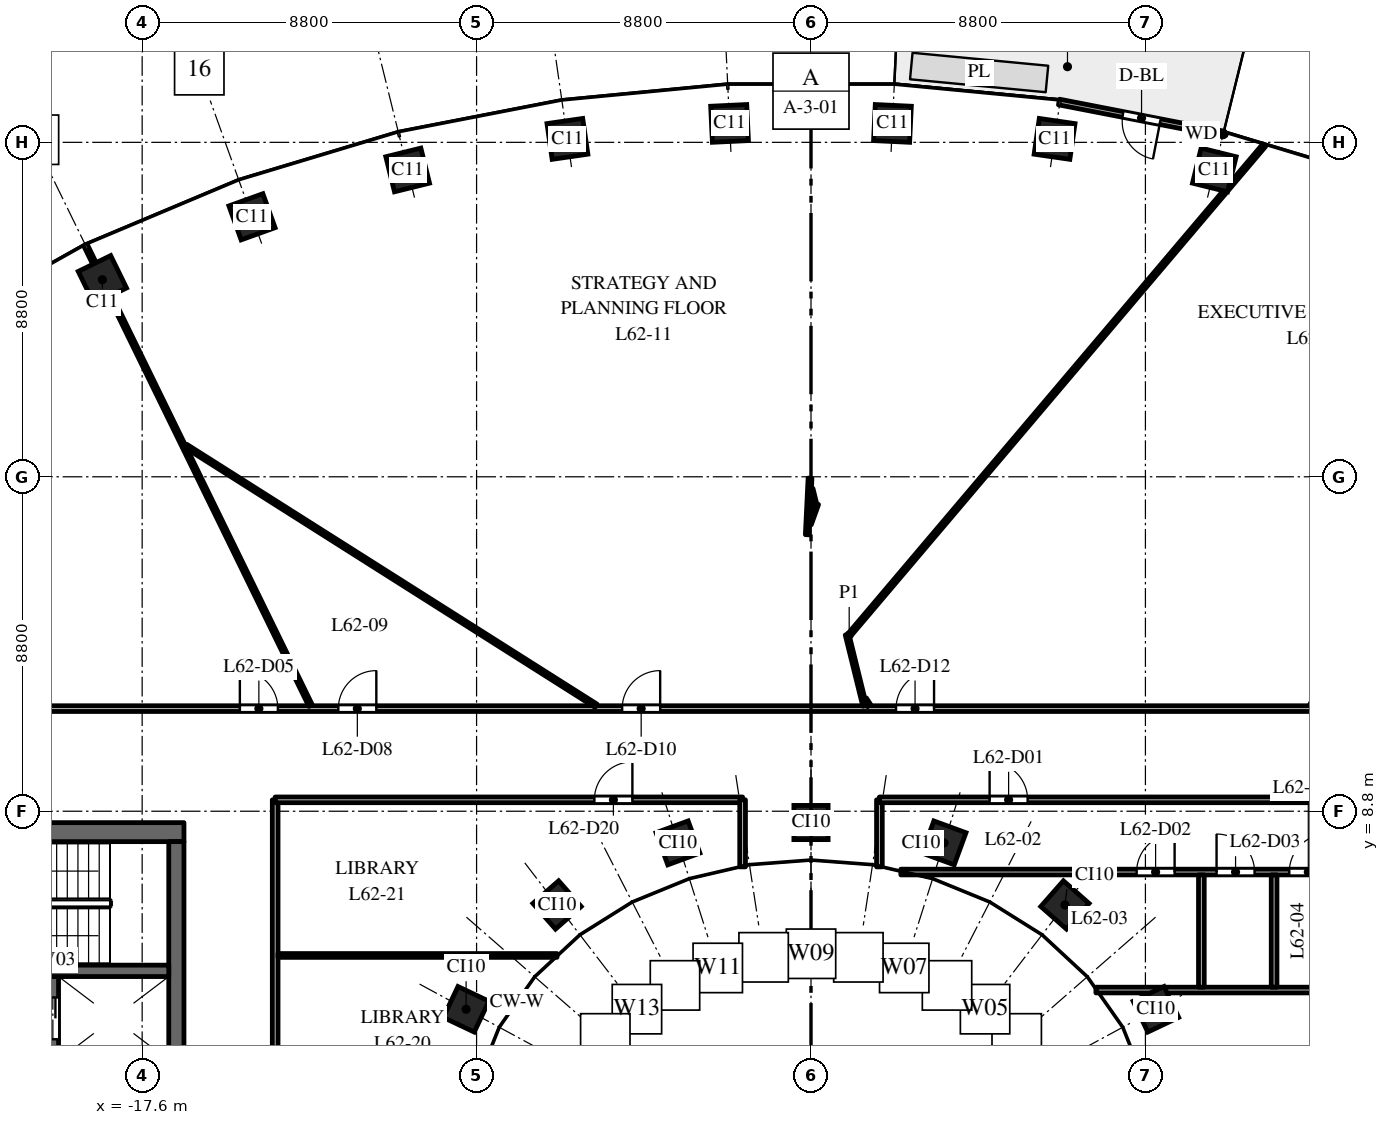
"""IFC4 building model, lengths in metres.
Left out: names, types, materials, properties, quantities, classifications, styles, units other than length and angle.
Written with IfcOpenShell. Run it as: python <this file> out.ifc"""

import sys

from ifc_helpers import new_model, si_unit, direction, frame, frame_2d, origin, origin_2d, place, context, subcontext, project, spatial, rectangle, extrude, element, fill, save


model = new_model("IFC4")
c1 = context("Model", 3, precision=1e-05, world=origin(), true_north=direction((0.0, 1.0)))
c2 = subcontext(c1, "Body", "Model", "MODEL_VIEW")
j1 = project(units=[si_unit("LENGTHUNIT", "METRE"), si_unit("PLANEANGLEUNIT", "RADIAN")], contexts=[c1])
p1 = place(None, origin())
s1 = spatial("IfcSite", under=j1, at=p1, CompositionType="ELEMENT")
p2 = place(p1, origin())
s2 = spatial("IfcBuilding", under=s1, at=p2, CompositionType="ELEMENT")
p3 = place(p2, frame((0.0, 0.0, 291.0)))
s3 = spatial("IfcBuildingStorey", under=s2, at=p3, CompositionType="ELEMENT", Elevation=291.0)
for number, where, z_axis, x_axis in (
    (1, (10.613, 25.674, 0.0), (0.0, 0.0, 1.0), (-0.971, 0.24, 0.0)),
    (2, (6.409, 26.491, 0.0), (0.0, 0.0, 1.0), (-0.99, 0.143, 0.0)),
    (3, (2.143, 26.898, 0.0), (0.0, 0.0, 1.0), (-0.999, 0.048, 0.0)),
    (4, (-2.143, 26.898, 0.0), (0.0, 0.0, 1.0), (-0.999, -0.048, 0.0)),
    (5, (-6.409, 26.491, 0.0), (0.0, 0.0, 1.0), (-0.99, -0.143, 0.0)),
    (6, (-10.613, 25.674, 0.0), (0.0, 0.0, 1.0), (-0.971, -0.24, 0.0)),
    (7, (-14.709, 24.441, 0.0), (0.0, 0.0, 1.0), (-0.941, -0.338, 0.0)),
    (8, (-18.646, 22.785, 0.0), (0.0, 0.0, 1.0), (-0.898, -0.439, 0.0)),
):
    element("IfcColumn", number, at=place(p3, frame(where, z_axis=z_axis, x_axis=x_axis)), inside=s3, PredefinedType="COLUMN", context=c2, shape_type="SweptSolid", body=[
        extrude(rectangle(XDim=0.95, YDim=0.95, at=origin_2d()), origin(), (0.0, 0.0, 1.0), 4.0),
    ])
for number, where, z_axis, x_axis in (
    (9, (9.076, 3.588, 0.0), (0.0, 0.0, 1.0), (-0.429, 0.903, 0.0)),
    (10, (6.682, 6.334, 0.0), (0.0, 0.0, 1.0), (-0.751, 0.66, 0.0)),
    (11, (3.501, 7.967, 0.0), (0.0, 0.0, 1.0), (-0.939, 0.344, 0.0)),
    (12, (0.0, 8.503, 0.0), (0.0, 0.0, 1.0), (-1.0, 0.0, 0.0)),
    (13, (-3.501, 7.967, 0.0), (0.0, 0.0, 1.0), (-0.939, -0.344, 0.0)),
    (14, (-6.682, 6.334, 0.0), (0.0, 0.0, 1.0), (-0.751, -0.66, 0.0)),
    (15, (-9.076, 3.588, 0.0), (0.0, 0.0, 1.0), (-0.429, -0.903, 0.0)),
):
    element("IfcColumn", number, at=place(p3, frame(where, z_axis=z_axis, x_axis=x_axis)), inside=s3, PredefinedType="COLUMN", context=c2, shape_type="SweptSolid", body=[
        extrude(rectangle(XDim=0.9, YDim=0.9, at=origin_2d()), origin(), (0.0, 0.0, 1.0), 4.0),
    ])
p4 = place(p3, frame((-16.5, 8.25, 0.0), z_axis=(0.0, 0.0, 1.0), x_axis=(-1.0, 0.0, 0.0)))
e16 = element("IfcWall", 16, at=p4, inside=s3, PredefinedType="SHEAR", context=c2, shape_type="SweptSolid", body=[
    extrude(rectangle(XDim=15.0, YDim=0.5, at=frame_2d((7.5, 0.0))), origin(), (0.0, 0.0, 1.0), 3.7),
])
p5 = place(p4, frame((6.9, 0.0, 0.0)))
e17 = element("IfcOpeningElement", 17, at=p5, cuts=e16, PredefinedType="OPENING", context=c2, shape_type="SweptSolid", body=[
    extrude(rectangle(XDim=1.2, YDim=2.1, at=frame_2d((0.6, 1.05))), frame((0.0, 0.26, 0.0), z_axis=(0.0, -1.0, 0.0), x_axis=(1.0, 0.0, 0.0)), (0.0, 0.0, 1.0), 0.52),
])
p6 = place(p4, frame((12.425, 0.0, 0.0)))
e18 = element("IfcOpeningElement", 18, at=p6, cuts=e16, PredefinedType="OPENING", context=c2, shape_type="SweptSolid", body=[
    extrude(rectangle(XDim=0.9, YDim=2.1, at=frame_2d((0.45, 1.05))), frame((0.0, 0.26, 0.0), z_axis=(0.0, -1.0, 0.0), x_axis=(1.0, 0.0, 0.0)), (0.0, 0.0, 1.0), 0.52),
])
p7 = place(p3, frame((-19.95, -4.45, 0.0), z_axis=(0.0, 0.0, 1.0), x_axis=(0.0, 1.0, 0.0)))
e19 = element("IfcWall", 19, at=p7, inside=s3, PredefinedType="SHEAR", context=c2, shape_type="SweptSolid", body=[
    extrude(rectangle(XDim=8.9, YDim=0.3, at=frame_2d((4.45, 0.0))), origin(), (0.0, 0.0, 1.0), 3.7),
])
p8 = place(p7, frame((0.775, 0.0, 0.0)))
e20 = element("IfcOpeningElement", 20, at=p8, cuts=e19, PredefinedType="OPENING", context=c2, shape_type="SweptSolid", body=[
    extrude(rectangle(XDim=1.2, YDim=2.1, at=frame_2d((0.6, 1.05))), frame((0.0, 0.16, 0.0), z_axis=(0.0, -1.0, 0.0), x_axis=(1.0, 0.0, 0.0)), (0.0, 0.0, 1.0), 0.32),
])
p9 = place(p7, frame((7.25, 0.0, 0.0)))
e21 = element("IfcOpeningElement", 21, at=p9, cuts=e19, PredefinedType="OPENING", context=c2, shape_type="SweptSolid", body=[
    extrude(rectangle(XDim=1.1, YDim=2.1, at=frame_2d((0.55, 1.05))), frame((0.0, 0.16, 0.0), z_axis=(0.0, -1.0, 0.0), x_axis=(1.0, 0.0, 0.0)), (0.0, 0.0, 1.0), 0.32),
])
p10 = place(p3, frame((-16.7, -8.0, 0.0), z_axis=(0.0, 0.0, 1.0), x_axis=(0.0, 1.0, 0.0)))
e22 = element("IfcWall", 22, at=p10, inside=s3, PredefinedType="SHEAR", context=c2, shape_type="SweptSolid", body=[
    extrude(rectangle(XDim=16.0, YDim=0.4, at=frame_2d((8.0, 0.0))), origin(), (0.0, 0.0, 1.0), 3.7),
])
p11 = place(p3, frame((-16.9, 4.6, 0.0), z_axis=(0.0, 0.0, 1.0), x_axis=(-1.0, 0.0, 0.0)))
e23 = element("IfcWall", 23, at=p11, inside=s3, PredefinedType="SHEAR", context=c2, shape_type="SweptSolid", body=[
    extrude(rectangle(XDim=6.18, YDim=0.3, at=frame_2d((3.09, 0.0))), origin(), (0.0, 0.0, 1.0), 3.7),
])
p12 = place(p11, frame((4.9, 0.0, 0.0)))
e24 = element("IfcOpeningElement", 24, at=p12, cuts=e23, PredefinedType="OPENING", context=c2, shape_type="SweptSolid", body=[
    extrude(rectangle(XDim=1.1, YDim=2.1, at=frame_2d((0.55, 1.05))), frame((0.0, 0.16, 0.0), z_axis=(0.0, -1.0, 0.0), x_axis=(1.0, 0.0, 0.0)), (0.0, 0.0, 1.0), 0.32),
])
p13 = place(p3, frame((10.871, 26.617, 0.0), z_axis=(0.0, 0.0, 1.0), x_axis=(-0.981631174778, 0.190788460615, 0.0)))
e25 = element("IfcWall", 25, at=p13, inside=s3, PredefinedType="STANDARD", context=c2, shape_type="SweptSolid", body=[
    extrude(rectangle(XDim=4.426, YDim=0.15, at=frame_2d((2.213, 0.0))), origin(), (0.0, 0.0, 1.0), 3.7),
])
p14 = place(p13, frame((1.713, 0.0, 0.0)))
e26 = element("IfcOpeningElement", 26, at=p14, cuts=e25, PredefinedType="OPENING", context=c2, shape_type="SweptSolid", body=[
    extrude(rectangle(XDim=1.0, YDim=2.4, at=frame_2d((0.5, 1.2))), frame((0.0, 0.085, 0.0), z_axis=(0.0, -1.0, 0.0), x_axis=(1.0, 0.0, 0.0)), (0.0, 0.0, 1.0), 0.17),
])
p15 = place(p3, frame((-31.5, 11.5, 0.0), z_axis=(0.0, 0.0, 1.0), x_axis=(1.0, 0.0, 0.0)))
e27 = element("IfcWall", 27, at=p15, inside=s3, PredefinedType="PARTITIONING", context=c2, shape_type="SweptSolid", body=[
    extrude(rectangle(XDim=63.0, YDim=0.15, at=frame_2d((31.5, 0.0))), origin(), (0.0, 0.0, 1.0), 2.75),
])
p16 = place(p15, frame((16.471, 0.0, 0.0)))
e28 = element("IfcOpeningElement", 28, at=p16, cuts=e27, PredefinedType="OPENING", context=c2, shape_type="SweptSolid", body=[
    extrude(rectangle(XDim=1.0, YDim=2.1, at=frame_2d((0.5, 1.05))), frame((0.0, 0.085, 0.0), z_axis=(0.0, -1.0, 0.0), x_axis=(1.0, 0.0, 0.0)), (0.0, 0.0, 1.0), 0.17),
])
p17 = place(p15, frame((19.062, 0.0, 0.0)))
e29 = element("IfcOpeningElement", 29, at=p17, cuts=e27, PredefinedType="OPENING", context=c2, shape_type="SweptSolid", body=[
    extrude(rectangle(XDim=1.0, YDim=2.1, at=frame_2d((0.5, 1.05))), frame((0.0, 0.085, 0.0), z_axis=(0.0, -1.0, 0.0), x_axis=(1.0, 0.0, 0.0)), (0.0, 0.0, 1.0), 0.17),
])
p18 = place(p15, frame((26.531, 0.0, 0.0)))
e30 = element("IfcOpeningElement", 30, at=p18, cuts=e27, PredefinedType="OPENING", context=c2, shape_type="SweptSolid", body=[
    extrude(rectangle(XDim=1.0, YDim=2.1, at=frame_2d((0.5, 1.05))), frame((0.0, 0.085, 0.0), z_axis=(0.0, -1.0, 0.0), x_axis=(1.0, 0.0, 0.0)), (0.0, 0.0, 1.0), 0.17),
])
p19 = place(p15, frame((33.738, 0.0, 0.0)))
e31 = element("IfcOpeningElement", 31, at=p19, cuts=e27, PredefinedType="OPENING", context=c2, shape_type="SweptSolid", body=[
    extrude(rectangle(XDim=1.0, YDim=2.1, at=frame_2d((0.5, 1.05))), frame((0.0, 0.085, 0.0), z_axis=(0.0, -1.0, 0.0), x_axis=(1.0, 0.0, 0.0)), (0.0, 0.0, 1.0), 0.17),
])
p20 = place(p15, frame((45.456, 0.0, 0.0)))
e32 = element("IfcOpeningElement", 32, at=p20, cuts=e27, PredefinedType="OPENING", context=c2, shape_type="SweptSolid", body=[
    extrude(rectangle(XDim=1.0, YDim=2.1, at=frame_2d((0.5, 1.05))), frame((0.0, 0.085, 0.0), z_axis=(0.0, -1.0, 0.0), x_axis=(1.0, 0.0, 0.0)), (0.0, 0.0, 1.0), 0.17),
])
p21 = place(p15, frame((57.85, 0.0, 0.0)))
e33 = element("IfcOpeningElement", 33, at=p21, cuts=e27, PredefinedType="OPENING", context=c2, shape_type="SweptSolid", body=[
    extrude(rectangle(XDim=1.0, YDim=2.1, at=frame_2d((0.5, 1.05))), frame((0.0, 0.085, 0.0), z_axis=(0.0, -1.0, 0.0), x_axis=(1.0, 0.0, 0.0)), (0.0, 0.0, 1.0), 0.17),
])
p22 = place(p3, frame((-19.086, 23.685, 0.0), z_axis=(0.0, 0.0, 1.0), x_axis=(0.439180235984, -0.898398976135, 0.0)))
e34 = element("IfcWall", 34, at=p22, inside=s3, PredefinedType="PARTITIONING", context=c2, shape_type="SweptSolid", body=[
    extrude(rectangle(XDim=13.475, YDim=0.1, at=frame_2d((6.738, 0.0))), origin(), (0.0, 0.0, 1.0), 2.75),
])
p23 = place(p3, frame((-16.452, 18.412, 0.0), z_axis=(0.0, 0.0, 1.0), x_axis=(0.844827711376, -0.535038445434, 0.0)))
e35 = element("IfcWall", 35, at=p23, inside=s3, PredefinedType="PARTITIONING", context=c2, shape_type="SweptSolid", body=[
    extrude(rectangle(XDim=12.779, YDim=0.1, at=frame_2d((6.389, 0.0))), origin(), (0.0, 0.0, 1.0), 2.75),
])
p24 = place(p3, frame((-14.1, 0.455, 0.0), z_axis=(0.0, 0.0, 1.0), x_axis=(0.0, 1.0, 0.0)))
e36 = element("IfcWall", 36, at=p24, inside=s3, PredefinedType="PARTITIONING", context=c2, shape_type="SweptSolid", body=[
    extrude(rectangle(XDim=8.645, YDim=0.15, at=frame_2d((4.323, 0.0))), origin(), (0.0, 0.0, 1.0), 3.7),
])
p25 = place(p3, frame((-14.025, 5.005, 0.0), z_axis=(0.0, 0.0, 1.0), x_axis=(1.0, 0.0, 0.0)))
e37 = element("IfcWall", 37, at=p25, inside=s3, PredefinedType="PARTITIONING", context=c2, shape_type="SweptSolid", body=[
    extrude(rectangle(XDim=7.341, YDim=0.1, at=frame_2d((3.67, 0.0))), origin(), (0.0, 0.0, 1.0), 3.0),
])
p26 = place(p3, frame((-14.1, 9.1, 0.0), z_axis=(0.0, 0.0, 1.0), x_axis=(1.0, 0.0, 0.0)))
e38 = element("IfcWall", 38, at=p26, inside=s3, PredefinedType="PARTITIONING", context=c2, shape_type="SweptSolid", body=[
    extrude(rectangle(XDim=12.3, YDim=0.15, at=frame_2d((6.15, 0.0))), origin(), (0.0, 0.0, 1.0), 2.75),
])
p27 = place(p26, frame((8.4, 0.0, 0.0)))
e39 = element("IfcOpeningElement", 39, at=p27, cuts=e38, PredefinedType="OPENING", context=c2, shape_type="SweptSolid", body=[
    extrude(rectangle(XDim=1.0, YDim=2.1, at=frame_2d((0.5, 1.05))), frame((0.0, 0.085, 0.0), z_axis=(0.0, -1.0, 0.0), x_axis=(1.0, 0.0, 0.0)), (0.0, 0.0, 1.0), 0.17),
])
p28 = place(p3, frame((-1.8, 7.336, 0.0), z_axis=(0.0, 0.0, 1.0), x_axis=(0.0, 1.0, 0.0)))
e40 = element("IfcWall", 40, at=p28, inside=s3, PredefinedType="PARTITIONING", context=c2, shape_type="SweptSolid", body=[
    extrude(rectangle(XDim=1.764, YDim=0.15, at=frame_2d((0.882, 0.0))), origin(), (0.0, 0.0, 1.0), 3.0),
])
p29 = place(p3, frame((-0.098, 16.075, 0.0), z_axis=(0.0, 0.0, 1.0), x_axis=(0.048312104461, 0.998832288506, 0.0)))
e41 = element("IfcWall", 41, at=p29, inside=s3, PredefinedType="PARTITIONING", context=c2, shape_type="SweptSolid", body=[
    extrude(rectangle(XDim=1.491, YDim=0.1, at=frame_2d((0.745, 0.0))), origin(), (0.0, 0.0, 1.0), 3.7),
])
p30 = place(p3, frame((-0.041, 16.352, 0.0), z_axis=(0.0, 0.0, 1.0), x_axis=(0.339570618506, 0.940580562763, 0.0)))
e42 = element("IfcWall", 42, at=p30, inside=s3, PredefinedType="PARTITIONING", context=c2, shape_type="SweptSolid", body=[
    extrude(rectangle(XDim=0.569, YDim=0.1, at=frame_2d((0.284, 0.0))), origin(), (0.0, 0.0, 1.0), 3.7),
])
p31 = place(p3, frame((0.003, 17.282, 0.0), z_axis=(0.0, 0.0, 1.0), x_axis=(0.238966259399, -0.971027871314, 0.0)))
e43 = element("IfcWall", 43, at=p31, inside=s3, PredefinedType="PARTITIONING", context=c2, shape_type="SweptSolid", body=[
    extrude(rectangle(XDim=0.403, YDim=0.1, at=frame_2d((0.201, 0.0))), origin(), (0.0, 0.0, 1.0), 3.7),
])
p32 = place(p3, frame((0.95, 13.448, 0.0), z_axis=(0.0, 0.0, 1.0), x_axis=(0.239556864004, -0.970882335254, 0.0)))
e44 = element("IfcWall", 44, at=p32, inside=s3, PredefinedType="PARTITIONING", context=c2, shape_type="SweptSolid", body=[
    extrude(rectangle(XDim=1.929, YDim=0.1, at=frame_2d((0.965, 0.0))), origin(), (0.0, 0.0, 1.0), 3.7),
])
p33 = place(p3, frame((1.005, 13.435, 0.0), z_axis=(0.0, 0.0, 1.0), x_axis=(0.646459104718, 0.762948639115, 0.0)))
e45 = element("IfcWall", 45, at=p33, inside=s3, PredefinedType="PARTITIONING", context=c2, shape_type="SweptSolid", body=[
    extrude(rectangle(XDim=16.892, YDim=0.1, at=frame_2d((8.446, 0.0))), origin(), (0.0, 0.0, 1.0), 2.85),
])
p34 = place(p3, frame((1.416, 11.753, 0.0), z_axis=(0.0, 0.0, 1.0), x_axis=(0.542473755858, -0.840072749353, 0.0)))
e46 = element("IfcWall", 46, at=p34, inside=s3, PredefinedType="PARTITIONING", context=c2, shape_type="SweptSolid", body=[
    extrude(rectangle(XDim=0.208, YDim=0.1, at=frame_2d((0.104, 0.0))), origin(), (0.0, 0.0, 1.0), 3.7),
])
p35 = place(p3, frame((1.8, 7.336, 0.0), z_axis=(0.0, 0.0, 1.0), x_axis=(0.0, 1.0, 0.0)))
e47 = element("IfcWall", 47, at=p35, inside=s3, PredefinedType="PARTITIONING", context=c2, shape_type="SweptSolid", body=[
    extrude(rectangle(XDim=1.764, YDim=0.15, at=frame_2d((0.882, 0.0))), origin(), (0.0, 0.0, 1.0), 3.0),
])
p36 = place(p3, frame((1.8, 9.1, 0.0), z_axis=(0.0, 0.0, 1.0), x_axis=(1.0, 0.0, 0.0)))
e48 = element("IfcWall", 48, at=p36, inside=s3, PredefinedType="PARTITIONING", context=c2, shape_type="SweptSolid", body=[
    extrude(rectangle(XDim=12.3, YDim=0.15, at=frame_2d((6.15, 0.0))), origin(), (0.0, 0.0, 1.0), 2.85),
])
p37 = place(p36, frame((2.9, 0.0, 0.0)))
e49 = element("IfcOpeningElement", 49, at=p37, cuts=e48, PredefinedType="OPENING", context=c2, shape_type="SweptSolid", body=[
    extrude(rectangle(XDim=1.0, YDim=2.1, at=frame_2d((0.5, 1.05))), frame((0.0, 0.085, 0.0), z_axis=(0.0, -1.0, 0.0), x_axis=(1.0, 0.0, 0.0)), (0.0, 0.0, 1.0), 0.17),
])
p38 = place(p3, frame((2.364, 7.2, 0.0), z_axis=(0.0, 0.0, 1.0), x_axis=(1.0, 0.0, 0.0)))
e50 = element("IfcWall", 50, at=p38, inside=s3, PredefinedType="PARTITIONING", context=c2, shape_type="SweptSolid", body=[
    extrude(rectangle(XDim=11.661, YDim=0.15, at=frame_2d((5.831, 0.0))), origin(), (0.0, 0.0, 1.0), 2.75),
])
p39 = place(p38, frame((6.204, 0.0, 0.0)))
e51 = element("IfcOpeningElement", 51, at=p39, cuts=e50, PredefinedType="OPENING", context=c2, shape_type="SweptSolid", body=[
    extrude(rectangle(XDim=1.0, YDim=2.1, at=frame_2d((0.5, 1.05))), frame((0.0, 0.085, 0.0), z_axis=(0.0, -1.0, 0.0), x_axis=(1.0, 0.0, 0.0)), (0.0, 0.0, 1.0), 0.17),
])
p40 = place(p38, frame((8.308, 0.0, 0.0)))
e52 = element("IfcOpeningElement", 52, at=p40, cuts=e50, PredefinedType="OPENING", context=c2, shape_type="SweptSolid", body=[
    extrude(rectangle(XDim=1.0, YDim=2.1, at=frame_2d((0.5, 1.05))), frame((0.0, 0.085, 0.0), z_axis=(0.0, -1.0, 0.0), x_axis=(1.0, 0.0, 0.0)), (0.0, 0.0, 1.0), 0.17),
])
p41 = place(p38, frame((10.222, 0.0, 0.0)))
e53 = element("IfcOpeningElement", 53, at=p41, cuts=e50, PredefinedType="OPENING", context=c2, shape_type="SweptSolid", body=[
    extrude(rectangle(XDim=1.0, YDim=2.1, at=frame_2d((0.5, 1.05))), frame((0.0, 0.085, 0.0), z_axis=(0.0, -1.0, 0.0), x_axis=(1.0, 0.0, 0.0)), (0.0, 0.0, 1.0), 0.17),
])
p42 = place(p3, frame((7.497, 4.095, 0.0), z_axis=(0.0, 0.0, 1.0), x_axis=(1.0, 0.0, 0.0)))
e54 = element("IfcWall", 54, at=p42, inside=s3, PredefinedType="PARTITIONING", context=c2, shape_type="SweptSolid", body=[
    extrude(rectangle(XDim=6.603, YDim=0.15, at=frame_2d((3.302, 0.0))), origin(), (0.0, 0.0, 1.0), 3.0),
])
for number, where, z_axis, x_axis in (
    (55, (10.272, 4.17, 0.0), (0.0, 0.0, 1.0), (0.0, 1.0, 0.0)),
    (56, (12.186, 4.17, 0.0), (0.0, 0.0, 1.0), (0.0, 1.0, 0.0)),
):
    element("IfcWall", number, at=place(p3, frame(where, z_axis=z_axis, x_axis=x_axis)), inside=s3, PredefinedType="PARTITIONING", context=c2, shape_type="SweptSolid", body=[
        extrude(rectangle(XDim=2.955, YDim=0.15, at=frame_2d((1.478, 0.0))), origin(), (0.0, 0.0, 1.0), 2.75),
    ])
p43 = place(p9, origin())
e57 = element("IfcDoor", 57, at=p43, inside=s3, OperationType="DOUBLE_DOOR_SLIDING", PredefinedType="DOOR", context=c2, shape_type="SweptSolid", body=[
    extrude(rectangle(XDim=1.1, YDim=2.1, at=frame_2d((0.55, 1.05))), frame((0.0, 0.025, 0.0), z_axis=(0.0, -1.0, 0.0), x_axis=(1.0, 0.0, 0.0)), (0.0, 0.0, 1.0), 0.05),
])
fill(e21, e57)
p44 = place(p14, origin())
e58 = element("IfcDoor", 58, at=p44, inside=s3, OperationType="SINGLE_SWING_LEFT", PredefinedType="DOOR", context=c2, shape_type="SweptSolid", body=[
    extrude(rectangle(XDim=1.0, YDim=2.4, at=frame_2d((0.5, 1.2))), frame((0.0, 0.025, 0.0), z_axis=(0.0, -1.0, 0.0), x_axis=(1.0, 0.0, 0.0)), (0.0, 0.0, 1.0), 0.05),
])
fill(e26, e58)
p45 = place(p37, origin())
e59 = element("IfcDoor", 59, at=p45, inside=s3, OperationType="SINGLE_SWING_LEFT", PredefinedType="DOOR", context=c2, shape_type="SweptSolid", body=[
    extrude(rectangle(XDim=1.0, YDim=2.1, at=frame_2d((0.5, 1.05))), frame((0.0, 0.025, 0.0), z_axis=(0.0, -1.0, 0.0), x_axis=(1.0, 0.0, 0.0)), (0.0, 0.0, 1.0), 0.05),
])
fill(e49, e59)
p46 = place(p39, origin())
e60 = element("IfcDoor", 60, at=p46, inside=s3, OperationType="SINGLE_SWING_RIGHT", PredefinedType="DOOR", context=c2, shape_type="SweptSolid", body=[
    extrude(rectangle(XDim=1.0, YDim=2.1, at=frame_2d((0.5, 1.05))), frame((0.0, 0.025, 0.0), z_axis=(0.0, -1.0, 0.0), x_axis=(1.0, 0.0, 0.0)), (0.0, 0.0, 1.0), 0.05),
])
fill(e51, e60)
p47 = place(p40, origin())
e61 = element("IfcDoor", 61, at=p47, inside=s3, OperationType="SINGLE_SWING_LEFT", PredefinedType="DOOR", context=c2, shape_type="SweptSolid", body=[
    extrude(rectangle(XDim=1.0, YDim=2.1, at=frame_2d((0.5, 1.05))), frame((0.0, 0.025, 0.0), z_axis=(0.0, -1.0, 0.0), x_axis=(1.0, 0.0, 0.0)), (0.0, 0.0, 1.0), 0.05),
])
fill(e52, e61)
p48 = place(p41, origin())
e62 = element("IfcDoor", 62, at=p48, inside=s3, OperationType="SINGLE_SWING_RIGHT", PredefinedType="DOOR", context=c2, shape_type="SweptSolid", body=[
    extrude(rectangle(XDim=1.0, YDim=2.1, at=frame_2d((0.5, 1.05))), frame((0.0, 0.025, 0.0), z_axis=(0.0, -1.0, 0.0), x_axis=(1.0, 0.0, 0.0)), (0.0, 0.0, 1.0), 0.05),
])
fill(e53, e62)
p49 = place(p16, origin())
e63 = element("IfcDoor", 63, at=p49, inside=s3, OperationType="SINGLE_SWING_LEFT", PredefinedType="DOOR", context=c2, shape_type="SweptSolid", body=[
    extrude(rectangle(XDim=1.0, YDim=2.1, at=frame_2d((0.5, 1.05))), frame((0.0, 0.025, 0.0), z_axis=(0.0, -1.0, 0.0), x_axis=(1.0, 0.0, 0.0)), (0.0, 0.0, 1.0), 0.05),
])
fill(e28, e63)
p50 = place(p17, origin())
e64 = element("IfcDoor", 64, at=p50, inside=s3, OperationType="SINGLE_SWING_RIGHT", PredefinedType="DOOR", context=c2, shape_type="SweptSolid", body=[
    extrude(rectangle(XDim=1.0, YDim=2.1, at=frame_2d((0.5, 1.05))), frame((0.0, 0.025, 0.0), z_axis=(0.0, -1.0, 0.0), x_axis=(1.0, 0.0, 0.0)), (0.0, 0.0, 1.0), 0.05),
])
fill(e29, e64)
p51 = place(p18, origin())
e65 = element("IfcDoor", 65, at=p51, inside=s3, OperationType="SINGLE_SWING_RIGHT", PredefinedType="DOOR", context=c2, shape_type="SweptSolid", body=[
    extrude(rectangle(XDim=1.0, YDim=2.1, at=frame_2d((0.5, 1.05))), frame((0.0, 0.025, 0.0), z_axis=(0.0, -1.0, 0.0), x_axis=(1.0, 0.0, 0.0)), (0.0, 0.0, 1.0), 0.05),
])
fill(e30, e65)
p52 = place(p19, origin())
e66 = element("IfcDoor", 66, at=p52, inside=s3, OperationType="SINGLE_SWING_RIGHT", PredefinedType="DOOR", context=c2, shape_type="SweptSolid", body=[
    extrude(rectangle(XDim=1.0, YDim=2.1, at=frame_2d((0.5, 1.05))), frame((0.0, 0.025, 0.0), z_axis=(0.0, -1.0, 0.0), x_axis=(1.0, 0.0, 0.0)), (0.0, 0.0, 1.0), 0.05),
])
fill(e31, e66)
p53 = place(p27, origin())
e67 = element("IfcDoor", 67, at=p53, inside=s3, OperationType="SINGLE_SWING_RIGHT", PredefinedType="DOOR", context=c2, shape_type="SweptSolid", body=[
    extrude(rectangle(XDim=1.0, YDim=2.1, at=frame_2d((0.5, 1.05))), frame((0.0, 0.025, 0.0), z_axis=(0.0, -1.0, 0.0), x_axis=(1.0, 0.0, 0.0)), (0.0, 0.0, 1.0), 0.05),
])
fill(e39, e67)
save(model, sys.argv[1])
